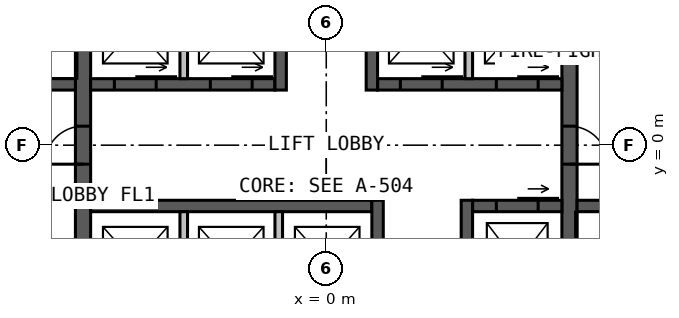
"""IFC4 building model, lengths in metres.
Left out: names, types, materials, properties, quantities, classifications, styles, units other than length and angle.
Written with IfcOpenShell. Run it as: python <this file> out.ifc"""

import sys

from ifc_helpers import new_model, si_unit, direction, frame, frame_2d, origin, place, context, subcontext, project, spatial, rectangle, extrude, element, fill, save


model = new_model("IFC4")
c1 = context("Model", 3, precision=1e-05, world=origin(), true_north=direction((0.0, 1.0)))
c2 = subcontext(c1, "Body", "Model", "MODEL_VIEW")
j1 = project(units=[si_unit("LENGTHUNIT", "METRE"), si_unit("PLANEANGLEUNIT", "RADIAN")], contexts=[c1])
p1 = place(None, origin())
s1 = spatial("IfcSite", under=j1, at=p1, CompositionType="ELEMENT")
p2 = place(p1, origin())
s2 = spatial("IfcBuilding", under=s1, at=p2, CompositionType="ELEMENT")
p3 = place(p2, frame((0.0, 0.0, 130.0)))
s3 = spatial("IfcBuildingStorey", under=s2, at=p3, CompositionType="ELEMENT", Elevation=130.0)
p4 = place(p3, frame((-6.4, -9.45, 0.0), z_axis=(0.0, 0.0, 1.0), x_axis=(0.0, 1.0, 0.0)))
e1 = element("IfcWall", 1, at=p4, inside=s3, PredefinedType="SOLIDWALL", context=c2, shape_type="SweptSolid", body=[
    extrude(rectangle(XDim=18.9, YDim=0.4, at=frame_2d((9.45, 0.0))), origin(), (0.0, 0.0, 1.0), 4.0),
])
p5 = place(p4, frame((8.95, 0.0, 0.0)))
e2 = element("IfcOpeningElement", 2, at=p5, cuts=e1, PredefinedType="OPENING", context=c2, shape_type="SweptSolid", body=[
    extrude(rectangle(XDim=1.0, YDim=2.2, at=frame_2d((0.5, 1.1))), frame((0.0, 0.21, 0.0), z_axis=(0.0, -1.0, 0.0), x_axis=(1.0, 0.0, 0.0)), (0.0, 0.0, 1.0), 0.42),
])
p6 = place(p3, frame((6.4, 9.45, 0.0), z_axis=(0.0, 0.0, 1.0), x_axis=(0.0, -1.0, 0.0)))
e3 = element("IfcWall", 3, at=p6, inside=s3, PredefinedType="SOLIDWALL", context=c2, shape_type="SweptSolid", body=[
    extrude(rectangle(XDim=18.9, YDim=0.4, at=frame_2d((9.45, 0.0))), origin(), (0.0, 0.0, 1.0), 4.0),
])
p7 = place(p6, frame((8.95, 0.0, 0.0)))
e4 = element("IfcOpeningElement", 4, at=p7, cuts=e3, PredefinedType="OPENING", context=c2, shape_type="SweptSolid", body=[
    extrude(rectangle(XDim=1.0, YDim=2.2, at=frame_2d((0.5, 1.1))), frame((0.0, 0.21, 0.0), z_axis=(0.0, -1.0, 0.0), x_axis=(1.0, 0.0, 0.0)), (0.0, 0.0, 1.0), 0.42),
])
p8 = place(p3, frame((-6.2, 1.6, 0.0), z_axis=(0.0, 0.0, 1.0), x_axis=(1.0, 0.0, 0.0)))
e5 = element("IfcWall", 5, at=p8, inside=s3, PredefinedType="SOLIDWALL", context=c2, shape_type="SweptSolid", body=[
    extrude(rectangle(XDim=4.85, YDim=0.3, at=frame_2d((2.425, 0.0))), origin(), (0.0, 0.0, 1.0), 4.0),
])
p9 = place(p8, frame((0.625, 0.0, 0.0)))
e6 = element("IfcOpeningElement", 6, at=p9, cuts=e5, PredefinedType="OPENING", context=c2, shape_type="SweptSolid", body=[
    extrude(rectangle(XDim=1.1, YDim=2.2, at=frame_2d((0.55, 1.1))), frame((0.0, 0.16, 0.0), z_axis=(0.0, -1.0, 0.0), x_axis=(1.0, 0.0, 0.0)), (0.0, 0.0, 1.0), 0.32),
])
p10 = place(p8, frame((3.15, 0.0, 0.0)))
e7 = element("IfcOpeningElement", 7, at=p10, cuts=e5, PredefinedType="OPENING", context=c2, shape_type="SweptSolid", body=[
    extrude(rectangle(XDim=1.1, YDim=2.2, at=frame_2d((0.55, 1.1))), frame((0.0, 0.16, 0.0), z_axis=(0.0, -1.0, 0.0), x_axis=(1.0, 0.0, 0.0)), (0.0, 0.0, 1.0), 0.32),
])
p11 = place(p3, frame((1.35, 1.6, 0.0), z_axis=(0.0, 0.0, 1.0), x_axis=(1.0, 0.0, 0.0)))
e8 = element("IfcWall", 8, at=p11, inside=s3, PredefinedType="SOLIDWALL", context=c2, shape_type="SweptSolid", body=[
    extrude(rectangle(XDim=4.85, YDim=0.3, at=frame_2d((2.425, 0.0))), origin(), (0.0, 0.0, 1.0), 4.0),
])
p12 = place(p11, frame((0.6, 0.0, 0.0)))
e9 = element("IfcOpeningElement", 9, at=p12, cuts=e8, PredefinedType="OPENING", context=c2, shape_type="SweptSolid", body=[
    extrude(rectangle(XDim=1.1, YDim=2.2, at=frame_2d((0.55, 1.1))), frame((0.0, 0.16, 0.0), z_axis=(0.0, -1.0, 0.0), x_axis=(1.0, 0.0, 0.0)), (0.0, 0.0, 1.0), 0.32),
])
p13 = place(p11, frame((3.125, 0.0, 0.0)))
e10 = element("IfcOpeningElement", 10, at=p13, cuts=e8, PredefinedType="OPENING", context=c2, shape_type="SweptSolid", body=[
    extrude(rectangle(XDim=1.1, YDim=2.2, at=frame_2d((0.55, 1.1))), frame((0.0, 0.16, 0.0), z_axis=(0.0, -1.0, 0.0), x_axis=(1.0, 0.0, 0.0)), (0.0, 0.0, 1.0), 0.32),
])
p14 = place(p3, frame((-1.2, 1.45, 0.0), z_axis=(0.0, 0.0, 1.0), x_axis=(0.0, 1.0, 0.0)))
e11 = element("IfcWall", 11, at=p14, inside=s3, PredefinedType="SOLIDWALL", context=c2, shape_type="SweptSolid", body=[
    extrude(rectangle(XDim=8.0, YDim=0.3, at=frame_2d((4.0, 0.0))), origin(), (0.0, 0.0, 1.0), 4.0),
])
p15 = place(p14, frame((5.05, 0.0, 0.0)))
e12 = element("IfcOpeningElement", 12, at=p15, cuts=e11, PredefinedType="OPENING", context=c2, shape_type="SweptSolid", body=[
    extrude(rectangle(XDim=1.0, YDim=2.2, at=frame_2d((0.5, 1.1))), frame((0.0, 0.16, 0.0), z_axis=(0.0, -1.0, 0.0), x_axis=(1.0, 0.0, 0.0)), (0.0, 0.0, 1.0), 0.32),
])
p16 = place(p3, frame((1.2, 1.45, 0.0), z_axis=(0.0, 0.0, 1.0), x_axis=(0.0, 1.0, 0.0)))
e13 = element("IfcWall", 13, at=p16, inside=s3, PredefinedType="SOLIDWALL", context=c2, shape_type="SweptSolid", body=[
    extrude(rectangle(XDim=8.0, YDim=0.3, at=frame_2d((4.0, 0.0))), origin(), (0.0, 0.0, 1.0), 4.0),
])
p17 = place(p16, frame((3.8, 0.0, 0.0)))
e14 = element("IfcOpeningElement", 14, at=p17, cuts=e13, PredefinedType="OPENING", context=c2, shape_type="SweptSolid", body=[
    extrude(rectangle(XDim=1.0, YDim=2.2, at=frame_2d((0.5, 1.1))), frame((0.0, 0.16, 0.0), z_axis=(0.0, -1.0, 0.0), x_axis=(1.0, 0.0, 0.0)), (0.0, 0.0, 1.0), 0.32),
])
p18 = place(p16, frame((6.15, 0.0, 0.0)))
e15 = element("IfcOpeningElement", 15, at=p18, cuts=e13, PredefinedType="OPENING", context=c2, shape_type="SweptSolid", body=[
    extrude(rectangle(XDim=1.0, YDim=2.2, at=frame_2d((0.5, 1.1))), frame((0.0, 0.16, 0.0), z_axis=(0.0, -1.0, 0.0), x_axis=(1.0, 0.0, 0.0)), (0.0, 0.0, 1.0), 0.32),
])
p19 = place(p3, frame((-6.2, -1.6, 0.0), z_axis=(0.0, 0.0, 1.0), x_axis=(1.0, 0.0, 0.0)))
e16 = element("IfcWall", 16, at=p19, inside=s3, PredefinedType="SOLIDWALL", context=c2, shape_type="SweptSolid", body=[
    extrude(rectangle(XDim=7.4, YDim=0.3, at=frame_2d((3.7, 0.0))), origin(), (0.0, 0.0, 1.0), 4.0),
])
p20 = place(p3, frame((3.85, -1.6, 0.0), z_axis=(0.0, 0.0, 1.0), x_axis=(1.0, 0.0, 0.0)))
e17 = element("IfcWall", 17, at=p20, inside=s3, PredefinedType="SOLIDWALL", context=c2, shape_type="SweptSolid", body=[
    extrude(rectangle(XDim=2.35, YDim=0.3, at=frame_2d((1.175, 0.0))), origin(), (0.0, 0.0, 1.0), 4.0),
])
p21 = place(p20, frame((0.625, 0.0, 0.0)))
e18 = element("IfcOpeningElement", 18, at=p21, cuts=e17, PredefinedType="OPENING", context=c2, shape_type="SweptSolid", body=[
    extrude(rectangle(XDim=1.1, YDim=2.2, at=frame_2d((0.55, 1.1))), frame((0.0, 0.16, 0.0), z_axis=(0.0, -1.0, 0.0), x_axis=(1.0, 0.0, 0.0)), (0.0, 0.0, 1.0), 0.32),
])
p22 = place(p3, frame((1.35, -1.45, 0.0), z_axis=(0.0, 0.0, 1.0), x_axis=(0.0, -1.0, 0.0)))
e19 = element("IfcWall", 19, at=p22, inside=s3, PredefinedType="SOLIDWALL", context=c2, shape_type="SweptSolid", body=[
    extrude(rectangle(XDim=8.0, YDim=0.3, at=frame_2d((4.0, 0.0))), origin(), (0.0, 0.0, 1.0), 4.0),
])
p23 = place(p22, frame((5.925, 0.0, 0.0)))
e20 = element("IfcOpeningElement", 20, at=p23, cuts=e19, PredefinedType="OPENING", context=c2, shape_type="SweptSolid", body=[
    extrude(rectangle(XDim=1.0, YDim=2.2, at=frame_2d((0.5, 1.1))), frame((0.0, 0.16, 0.0), z_axis=(0.0, -1.0, 0.0), x_axis=(1.0, 0.0, 0.0)), (0.0, 0.0, 1.0), 0.32),
])
p24 = place(p22, frame((3.525, 0.0, 0.0)))
e21 = element("IfcOpeningElement", 21, at=p24, cuts=e19, PredefinedType="OPENING", context=c2, shape_type="SweptSolid", body=[
    extrude(rectangle(XDim=0.9, YDim=2.2, at=frame_2d((0.45, 1.1))), frame((0.0, 0.16, 0.0), z_axis=(0.0, -1.0, 0.0), x_axis=(1.0, 0.0, 0.0)), (0.0, 0.0, 1.0), 0.32),
])
p25 = place(p3, frame((3.7, -1.45, 0.0), z_axis=(0.0, 0.0, 1.0), x_axis=(0.0, -1.0, 0.0)))
e22 = element("IfcWall", 22, at=p25, inside=s3, PredefinedType="SOLIDWALL", context=c2, shape_type="SweptSolid", body=[
    extrude(rectangle(XDim=8.0, YDim=0.3, at=frame_2d((4.0, 0.0))), origin(), (0.0, 0.0, 1.0), 4.0),
])
p26 = place(p25, frame((5.1, 0.0, 0.0)))
e23 = element("IfcOpeningElement", 23, at=p26, cuts=e22, PredefinedType="OPENING", context=c2, shape_type="SweptSolid", body=[
    extrude(rectangle(XDim=0.9, YDim=2.2, at=frame_2d((0.45, 1.1))), frame((0.0, 0.16, 0.0), z_axis=(0.0, -1.0, 0.0), x_axis=(1.0, 0.0, 0.0)), (0.0, 0.0, 1.0), 0.32),
])
p27 = place(p3, frame((-9.45, 1.6, 0.0), z_axis=(0.0, 0.0, 1.0), x_axis=(1.0, 0.0, 0.0)))
e24 = element("IfcWall", 24, at=p27, inside=s3, PredefinedType="SOLIDWALL", context=c2, shape_type="SweptSolid", body=[
    extrude(rectangle(XDim=2.85, YDim=0.3, at=frame_2d((1.425, 0.0))), origin(), (0.0, 0.0, 1.0), 4.0),
])
p28 = place(p27, frame((0.925, 0.0, 0.0)))
e25 = element("IfcOpeningElement", 25, at=p28, cuts=e24, PredefinedType="OPENING", context=c2, shape_type="SweptSolid", body=[
    extrude(rectangle(XDim=1.0, YDim=2.2, at=frame_2d((0.5, 1.1))), frame((0.0, 0.16, 0.0), z_axis=(0.0, -1.0, 0.0), x_axis=(1.0, 0.0, 0.0)), (0.0, 0.0, 1.0), 0.32),
])
p29 = place(p3, frame((6.6, -1.6, 0.0), z_axis=(0.0, 0.0, 1.0), x_axis=(1.0, 0.0, 0.0)))
e26 = element("IfcWall", 26, at=p29, inside=s3, PredefinedType="SOLIDWALL", context=c2, shape_type="SweptSolid", body=[
    extrude(rectangle(XDim=2.85, YDim=0.3, at=frame_2d((1.425, 0.0))), origin(), (0.0, 0.0, 1.0), 4.0),
])
p30 = place(p29, frame((0.925, 0.0, 0.0)))
e27 = element("IfcOpeningElement", 27, at=p30, cuts=e26, PredefinedType="OPENING", context=c2, shape_type="SweptSolid", body=[
    extrude(rectangle(XDim=1.0, YDim=2.2, at=frame_2d((0.5, 1.1))), frame((0.0, 0.16, 0.0), z_axis=(0.0, -1.0, 0.0), x_axis=(1.0, 0.0, 0.0)), (0.0, 0.0, 1.0), 0.32),
])
for number, where, z_axis, x_axis in (
    (28, (-3.75, 1.75, 0.0), (0.0, 0.0, 1.0), (0.0, 1.0, 0.0)),
    (29, (3.75, 1.75, 0.0), (0.0, 0.0, 1.0), (0.0, 1.0, 0.0)),
    (30, (-3.75, -1.75, 0.0), (0.0, 0.0, 1.0), (0.0, -1.0, 0.0)),
    (31, (-1.25, -1.75, 0.0), (0.0, 0.0, 1.0), (0.0, -1.0, 0.0)),
):
    element("IfcWall", number, at=place(p3, frame(where, z_axis=z_axis, x_axis=x_axis)), inside=s3, PredefinedType="SOLIDWALL", context=c2, shape_type="SweptSolid", body=[
        extrude(rectangle(XDim=2.7, YDim=0.2, at=frame_2d((1.35, 0.0))), origin(), (0.0, 0.0, 1.0), 3.75),
    ])
p31 = place(p5, origin())
e32 = element("IfcDoor", 32, at=p31, inside=s3, OperationType="SINGLE_SWING_LEFT", PredefinedType="DOOR", context=c2, shape_type="SweptSolid", body=[
    extrude(rectangle(XDim=1.0, YDim=2.2, at=frame_2d((0.5, 1.1))), frame((0.0, 0.025, 0.0), z_axis=(0.0, -1.0, 0.0), x_axis=(1.0, 0.0, 0.0)), (0.0, 0.0, 1.0), 0.05),
])
fill(e2, e32)
p32 = place(p7, origin())
e33 = element("IfcDoor", 33, at=p32, inside=s3, OperationType="SINGLE_SWING_RIGHT", PredefinedType="DOOR", context=c2, shape_type="SweptSolid", body=[
    extrude(rectangle(XDim=1.0, YDim=2.2, at=frame_2d((0.5, 1.1))), frame((0.0, 0.025, 0.0), z_axis=(0.0, -1.0, 0.0), x_axis=(1.0, 0.0, 0.0)), (0.0, 0.0, 1.0), 0.05),
])
fill(e4, e33)
p33 = place(p9, origin())
e34 = element("IfcDoor", 34, at=p33, inside=s3, OperationType="SLIDING_TO_LEFT", PredefinedType="DOOR", context=c2, shape_type="SweptSolid", body=[
    extrude(rectangle(XDim=1.1, YDim=2.2, at=frame_2d((0.55, 1.1))), frame((0.0, 0.025, 0.0), z_axis=(0.0, -1.0, 0.0), x_axis=(1.0, 0.0, 0.0)), (0.0, 0.0, 1.0), 0.05),
])
fill(e6, e34)
p34 = place(p10, origin())
e35 = element("IfcDoor", 35, at=p34, inside=s3, OperationType="SLIDING_TO_LEFT", PredefinedType="DOOR", context=c2, shape_type="SweptSolid", body=[
    extrude(rectangle(XDim=1.1, YDim=2.2, at=frame_2d((0.55, 1.1))), frame((0.0, 0.025, 0.0), z_axis=(0.0, -1.0, 0.0), x_axis=(1.0, 0.0, 0.0)), (0.0, 0.0, 1.0), 0.05),
])
fill(e7, e35)
p35 = place(p12, origin())
e36 = element("IfcDoor", 36, at=p35, inside=s3, OperationType="SLIDING_TO_LEFT", PredefinedType="DOOR", context=c2, shape_type="SweptSolid", body=[
    extrude(rectangle(XDim=1.1, YDim=2.2, at=frame_2d((0.55, 1.1))), frame((0.0, 0.025, 0.0), z_axis=(0.0, -1.0, 0.0), x_axis=(1.0, 0.0, 0.0)), (0.0, 0.0, 1.0), 0.05),
])
fill(e9, e36)
p36 = place(p13, origin())
e37 = element("IfcDoor", 37, at=p36, inside=s3, OperationType="SLIDING_TO_LEFT", PredefinedType="DOOR", context=c2, shape_type="SweptSolid", body=[
    extrude(rectangle(XDim=1.1, YDim=2.2, at=frame_2d((0.55, 1.1))), frame((0.0, 0.025, 0.0), z_axis=(0.0, -1.0, 0.0), x_axis=(1.0, 0.0, 0.0)), (0.0, 0.0, 1.0), 0.05),
])
fill(e10, e37)
p37 = place(p21, origin())
e38 = element("IfcDoor", 38, at=p37, inside=s3, OperationType="SLIDING_TO_LEFT", PredefinedType="DOOR", context=c2, shape_type="SweptSolid", body=[
    extrude(rectangle(XDim=1.1, YDim=2.2, at=frame_2d((0.55, 1.1))), frame((0.0, 0.025, 0.0), z_axis=(0.0, -1.0, 0.0), x_axis=(1.0, 0.0, 0.0)), (0.0, 0.0, 1.0), 0.05),
])
fill(e18, e38)
save(model, sys.argv[1])
